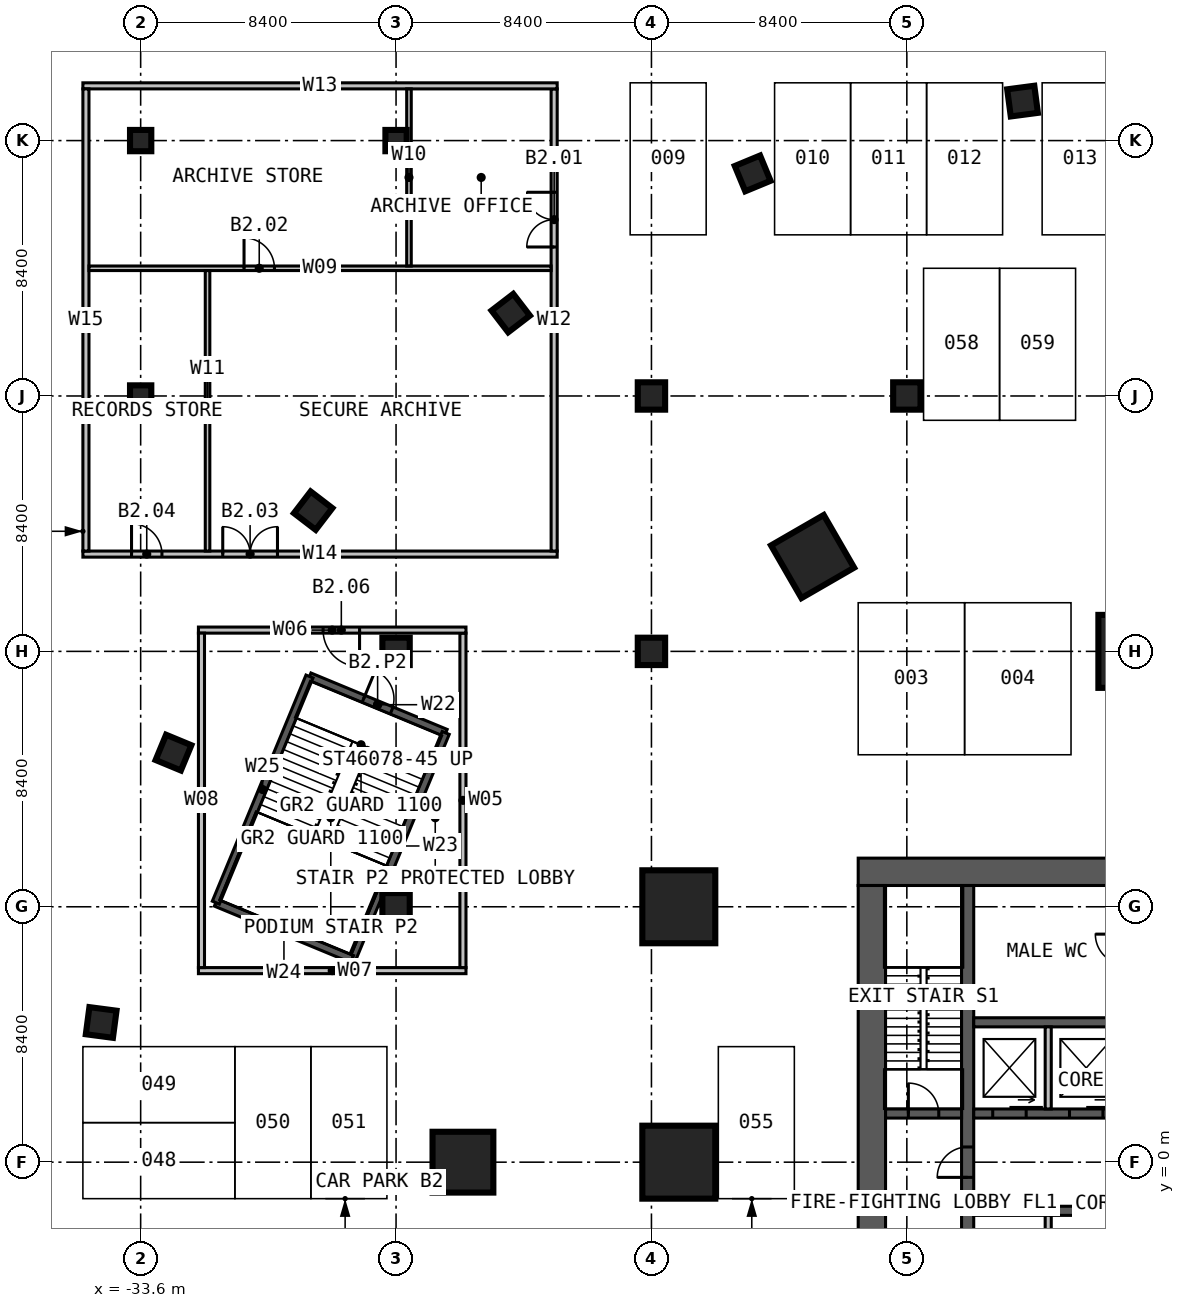
"""IFC4 building model, lengths in metres.
Left out: names, types, materials, properties, quantities, classifications, styles, units other than length and angle.
Written with IfcOpenShell. Run it as: python <this file> out.ifc"""

import sys

from ifc_helpers import new_model, si_unit, direction, frame, frame_2d, origin, origin_2d, place, context, subcontext, project, spatial, rectangle, hollow_rectangle, extrude, element, fill, save


model = new_model("IFC4")
c1 = context("Model", 3, precision=1e-05, world=origin(), true_north=direction((0.0, 1.0)))
c2 = subcontext(c1, "Body", "Model", "MODEL_VIEW")
j1 = project(units=[si_unit("LENGTHUNIT", "METRE"), si_unit("PLANEANGLEUNIT", "RADIAN")], contexts=[c1])
p1 = place(None, origin())
s1 = spatial("IfcSite", under=j1, at=p1, CompositionType="ELEMENT")
p2 = place(p1, origin())
s2 = spatial("IfcBuilding", under=s1, at=p2, CompositionType="ELEMENT")
p3 = place(p2, frame((0.0, 0.0, -9.0)))
s3 = spatial("IfcBuildingStorey", under=s2, at=p3, CompositionType="ELEMENT", Elevation=-9.0)
for number, where, z_axis, x_axis in (
    (1, (-25.2, 8.4, 0.0), (0.0, 0.0, 1.0), (1.0, 0.0, 0.0)),
    (2, (-25.2, 16.8, 0.0), (0.0, 0.0, 1.0), (1.0, 0.0, 0.0)),
):
    element("IfcColumn", number, at=place(p3, frame(where, z_axis=z_axis, x_axis=x_axis)), inside=s3, PredefinedType="COLUMN", context=c2, shape_type="SweptSolid", body=[
        extrude(rectangle(XDim=0.9, YDim=0.9, at=origin_2d()), origin(), (0.0, 0.0, 1.0), 4.5),
    ])
for number, where, z_axis, x_axis in (
    (3, (-15.9, 0.0, 0.0), (0.0, 0.0, 1.0), (1.0, 0.0, 0.0)),
    (4, (-15.9, 8.4, 0.0), (0.0, 0.0, 1.0), (1.0, 0.0, 0.0)),
):
    element("IfcColumn", number, at=place(p3, frame(where, z_axis=z_axis, x_axis=x_axis)), inside=s3, PredefinedType="COLUMN", context=c2, shape_type="SweptSolid", body=[
        extrude(rectangle(XDim=2.4, YDim=2.4, at=origin_2d()), origin(), (0.0, 0.0, 1.0), 4.5),
    ])
for number, where, z_axis, x_axis in (
    (5, (-16.8, 16.8, 0.0), (0.0, 0.0, 1.0), (1.0, 0.0, 0.0)),
    (6, (-16.8, 25.2, 0.0), (0.0, 0.0, 1.0), (1.0, 0.0, 0.0)),
    (7, (-8.4, 25.2, 0.0), (0.0, 0.0, 1.0), (1.0, 0.0, 0.0)),
):
    element("IfcColumn", number, at=place(p3, frame(where, z_axis=z_axis, x_axis=x_axis)), inside=s3, PredefinedType="COLUMN", context=c2, shape_type="SweptSolid", body=[
        extrude(rectangle(XDim=0.9, YDim=0.9, at=origin_2d()), origin(), (0.0, 0.0, 1.0), 4.5),
    ])
p4 = place(p3, frame((-0.9, 16.8, 0.0), z_axis=(0.0, 0.0, 1.0), x_axis=(1.0, 0.0, 0.0)))
e8 = element("IfcColumn", 8, at=p4, inside=s3, PredefinedType="COLUMN", context=c2, shape_type="SweptSolid", body=[
    extrude(rectangle(XDim=2.4, YDim=2.4, at=origin_2d()), origin(), (0.0, 0.0, 1.0), 4.5),
])
for number, where, z_axis, x_axis in (
    (9, (-33.6, 25.2, 0.0), (0.0, 0.0, 1.0), (1.0, 0.0, 0.0)),
    (10, (-33.6, 33.6, 0.0), (0.0, 0.0, 1.0), (1.0, 0.0, 0.0)),
    (11, (-25.2, 33.6, 0.0), (0.0, 0.0, 1.0), (1.0, 0.0, 0.0)),
):
    element("IfcColumn", number, at=place(p3, frame(where, z_axis=z_axis, x_axis=x_axis)), inside=s3, PredefinedType="COLUMN", context=c2, shape_type="SweptSolid", body=[
        extrude(rectangle(XDim=0.7, YDim=0.7, at=origin_2d()), origin(), (0.0, 0.0, 1.0), 4.5),
    ])
for number, where, z_axis, x_axis in (
    (12, (-4.594, 34.899, 0.0), (0.0, 0.0, 1.0), (-0.131, 0.991, 0.0)),
    (13, (-13.47, 32.521, 0.0), (0.0, 0.0, 1.0), (-0.383, 0.924, 0.0)),
    (14, (-21.428, 27.926, 0.0), (0.0, 0.0, 1.0), (-0.609, 0.793, 0.0)),
    (15, (-27.926, 21.428, 0.0), (0.0, 0.0, 1.0), (-0.793, 0.609, 0.0)),
    (16, (-32.521, 13.47, 0.0), (0.0, 0.0, 1.0), (-0.924, 0.383, 0.0)),
    (17, (-34.899, 4.594, 0.0), (0.0, 0.0, 1.0), (-0.991, 0.131, 0.0)),
):
    element("IfcColumn", number, at=place(p3, frame(where, z_axis=z_axis, x_axis=x_axis)), inside=s3, PredefinedType="COLUMN", context=c2, shape_type="SweptSolid", body=[
        extrude(rectangle(XDim=0.9, YDim=0.9, at=origin_2d()), origin(), (0.0, 0.0, 1.0), 4.5),
    ])
for number, where, z_axis, x_axis in (
    (18, (-11.5, 19.919, 0.0), (0.0, 0.0, 1.0), (-0.5, 0.866, 0.0)),
    (19, (-23.0, 0.0, 0.0), (0.0, 0.0, 1.0), (-1.0, 0.0, 0.0)),
):
    element("IfcColumn", number, at=place(p3, frame(where, z_axis=z_axis, x_axis=x_axis)), inside=s3, PredefinedType="COLUMN", context=c2, shape_type="SweptSolid", body=[
        extrude(hollow_rectangle(XDim=2.0, YDim=2.0, WallThickness=0.24, at=origin_2d()), origin(), (0.0, 0.0, 1.0), 4.5),
    ])
p5 = place(p3, frame((-10.0, 9.55, 0.0), z_axis=(0.0, 0.0, 1.0), x_axis=(1.0, 0.0, 0.0)))
e20 = element("IfcWall", 20, at=p5, inside=s3, PredefinedType="SOLIDWALL", context=c2, shape_type="SweptSolid", body=[
    extrude(rectangle(XDim=20.0, YDim=0.9, at=frame_2d((10.0, 0.0))), origin(), (0.0, 0.0, 1.0), 4.5),
])
p6 = place(p5, frame((9.4, 0.0, 0.0)))
e21 = element("IfcOpeningElement", 21, at=p6, cuts=e20, PredefinedType="OPENING", context=c2, shape_type="SweptSolid", body=[
    extrude(rectangle(XDim=1.2, YDim=2.2, at=frame_2d((0.6, 1.1))), frame((0.0, 0.46, 0.0), z_axis=(0.0, -1.0, 0.0), x_axis=(1.0, 0.0, 0.0)), (0.0, 0.0, 1.0), 0.92),
])
p7 = place(p3, frame((-9.55, 9.1, 0.0), z_axis=(0.0, 0.0, 1.0), x_axis=(0.0, -1.0, 0.0)))
e22 = element("IfcWall", 22, at=p7, inside=s3, PredefinedType="SOLIDWALL", context=c2, shape_type="SweptSolid", body=[
    extrude(rectangle(XDim=18.2, YDim=0.9, at=frame_2d((9.1, 0.0))), origin(), (0.0, 0.0, 1.0), 4.5),
])
p8 = place(p3, frame((-6.4, -9.1, 0.0), z_axis=(0.0, 0.0, 1.0), x_axis=(0.0, 1.0, 0.0)))
e23 = element("IfcWall", 23, at=p8, inside=s3, PredefinedType="SOLIDWALL", context=c2, shape_type="SweptSolid", body=[
    extrude(rectangle(XDim=18.2, YDim=0.4, at=frame_2d((9.1, 0.0))), origin(), (0.0, 0.0, 1.0), 4.5),
])
p9 = place(p8, frame((8.6, 0.0, 0.0)))
e24 = element("IfcOpeningElement", 24, at=p9, cuts=e23, PredefinedType="OPENING", context=c2, shape_type="SweptSolid", body=[
    extrude(rectangle(XDim=1.0, YDim=2.2, at=frame_2d((0.5, 1.1))), frame((0.0, 0.21, 0.0), z_axis=(0.0, -1.0, 0.0), x_axis=(1.0, 0.0, 0.0)), (0.0, 0.0, 1.0), 0.42),
])
p10 = place(p3, frame((-6.2, 1.6, 0.0), z_axis=(0.0, 0.0, 1.0), x_axis=(1.0, 0.0, 0.0)))
e25 = element("IfcWall", 25, at=p10, inside=s3, PredefinedType="SOLIDWALL", context=c2, shape_type="SweptSolid", body=[
    extrude(rectangle(XDim=4.85, YDim=0.3, at=frame_2d((2.425, 0.0))), origin(), (0.0, 0.0, 1.0), 4.5),
])
p11 = place(p10, frame((0.625, 0.0, 0.0)))
e26 = element("IfcOpeningElement", 26, at=p11, cuts=e25, PredefinedType="OPENING", context=c2, shape_type="SweptSolid", body=[
    extrude(rectangle(XDim=1.1, YDim=2.2, at=frame_2d((0.55, 1.1))), frame((0.0, 0.16, 0.0), z_axis=(0.0, -1.0, 0.0), x_axis=(1.0, 0.0, 0.0)), (0.0, 0.0, 1.0), 0.32),
])
p12 = place(p10, frame((3.15, 0.0, 0.0)))
e27 = element("IfcOpeningElement", 27, at=p12, cuts=e25, PredefinedType="OPENING", context=c2, shape_type="SweptSolid", body=[
    extrude(rectangle(XDim=1.1, YDim=2.2, at=frame_2d((0.55, 1.1))), frame((0.0, 0.16, 0.0), z_axis=(0.0, -1.0, 0.0), x_axis=(1.0, 0.0, 0.0)), (0.0, 0.0, 1.0), 0.32),
])
p13 = place(p3, frame((-6.2, 4.6, 0.0), z_axis=(0.0, 0.0, 1.0), x_axis=(1.0, 0.0, 0.0)))
e28 = element("IfcWall", 28, at=p13, inside=s3, PredefinedType="SOLIDWALL", context=c2, shape_type="SweptSolid", body=[
    extrude(rectangle(XDim=4.85, YDim=0.3, at=frame_2d((2.425, 0.0))), origin(), (0.0, 0.0, 1.0), 4.5),
])
p14 = place(p3, frame((-6.2, -1.6, 0.0), z_axis=(0.0, 0.0, 1.0), x_axis=(1.0, 0.0, 0.0)))
e29 = element("IfcWall", 29, at=p14, inside=s3, PredefinedType="SOLIDWALL", context=c2, shape_type="SweptSolid", body=[
    extrude(rectangle(XDim=7.4, YDim=0.3, at=frame_2d((3.7, 0.0))), origin(), (0.0, 0.0, 1.0), 4.5),
])
p15 = place(p3, frame((-9.1, 1.6, 0.0), z_axis=(0.0, 0.0, 1.0), x_axis=(1.0, 0.0, 0.0)))
e30 = element("IfcWall", 30, at=p15, inside=s3, PredefinedType="SOLIDWALL", context=c2, shape_type="SweptSolid", body=[
    extrude(rectangle(XDim=2.5, YDim=0.3, at=frame_2d((1.25, 0.0))), origin(), (0.0, 0.0, 1.0), 4.5),
])
p16 = place(p15, frame((0.75, 0.0, 0.0)))
e31 = element("IfcOpeningElement", 31, at=p16, cuts=e30, PredefinedType="OPENING", context=c2, shape_type="SweptSolid", body=[
    extrude(rectangle(XDim=1.0, YDim=2.2, at=frame_2d((0.5, 1.1))), frame((0.0, 0.16, 0.0), z_axis=(0.0, -1.0, 0.0), x_axis=(1.0, 0.0, 0.0)), (0.0, 0.0, 1.0), 0.32),
])
for number, where, z_axis, x_axis in (
    (32, (-3.75, 1.75, 0.0), (0.0, 0.0, 1.0), (0.0, 1.0, 0.0)),
    (33, (-3.75, -1.75, 0.0), (0.0, 0.0, 1.0), (0.0, -1.0, 0.0)),
):
    element("IfcWall", number, at=place(p3, frame(where, z_axis=z_axis, x_axis=x_axis)), inside=s3, PredefinedType="SOLIDWALL", context=c2, shape_type="SweptSolid", body=[
        extrude(rectangle(XDim=2.7, YDim=0.2, at=frame_2d((1.35, 0.0))), origin(), (0.0, 0.0, 1.0), 4.25),
    ])
p17 = place(p3, frame((-28.047, 15.974, 0.0), z_axis=(0.0, 0.0, 1.0), x_axis=(0.923862828997, -0.382723755727, 0.0)))
e34 = element("IfcWall", 34, at=p17, inside=s3, PredefinedType="SOLIDWALL", context=c2, shape_type="SweptSolid", body=[
    extrude(rectangle(XDim=4.85, YDim=0.25, at=frame_2d((2.425, 0.0))), origin(), (0.0, 0.0, 1.0), 4.5),
])
p18 = place(p17, frame((1.925, 0.0, 0.0)))
e35 = element("IfcOpeningElement", 35, at=p18, cuts=e34, PredefinedType="OPENING", context=c2, shape_type="SweptSolid", body=[
    extrude(rectangle(XDim=1.0, YDim=2.2, at=frame_2d((0.5, 1.1))), frame((0.0, 0.135, 0.0), z_axis=(0.0, -1.0, 0.0), x_axis=(1.0, 0.0, 0.0)), (0.0, 0.0, 1.0), 0.27),
])
p19 = place(p3, frame((-23.566, 14.118, 0.0), z_axis=(0.0, 0.0, 1.0), x_axis=(-0.382689294869, -0.923877104161, 0.0)))
e36 = element("IfcWall", 36, at=p19, inside=s3, PredefinedType="SOLIDWALL", context=c2, shape_type="SweptSolid", body=[
    extrude(rectangle(XDim=8.05, YDim=0.25, at=frame_2d((4.025, 0.0))), origin(), (0.0, 0.0, 1.0), 4.5),
])
p20 = place(p3, frame((-26.647, 6.681, 0.0), z_axis=(0.0, 0.0, 1.0), x_axis=(-0.923880627248, 0.382680789426, 0.0)))
e37 = element("IfcWall", 37, at=p20, inside=s3, PredefinedType="SOLIDWALL", context=c2, shape_type="SweptSolid", body=[
    extrude(rectangle(XDim=4.85, YDim=0.25, at=frame_2d((2.425, 0.0))), origin(), (0.0, 0.0, 1.0), 4.5),
])
p21 = place(p3, frame((-31.127, 8.537, 0.0), z_axis=(0.0, 0.0, 1.0), x_axis=(0.382678572144, 0.923881545666, 0.0)))
e38 = element("IfcWall", 38, at=p21, inside=s3, PredefinedType="SOLIDWALL", context=c2, shape_type="SweptSolid", body=[
    extrude(rectangle(XDim=8.05, YDim=0.25, at=frame_2d((4.025, 0.0))), origin(), (0.0, 0.0, 1.0), 4.5),
])
p22 = place(p3, frame((-31.7, 6.3, 0.0), z_axis=(0.0, 0.0, 1.0), x_axis=(1.0, 0.0, 0.0)))
e39 = element("IfcWall", 39, at=p22, inside=s3, PredefinedType="PARTITIONING", context=c2, shape_type="SweptSolid", body=[
    extrude(rectangle(XDim=8.8, YDim=0.2, at=frame_2d((4.4, 0.0))), origin(), (0.0, 0.0, 1.0), 4.2),
])
p23 = place(p3, frame((-23.0, 6.4, 0.0), z_axis=(0.0, 0.0, 1.0), x_axis=(0.0, 1.0, 0.0)))
e40 = element("IfcWall", 40, at=p23, inside=s3, PredefinedType="PARTITIONING", context=c2, shape_type="SweptSolid", body=[
    extrude(rectangle(XDim=11.0, YDim=0.2, at=frame_2d((5.5, 0.0))), origin(), (0.0, 0.0, 1.0), 4.2),
])
p24 = place(p3, frame((-22.9, 17.5, 0.0), z_axis=(0.0, 0.0, 1.0), x_axis=(-1.0, 0.0, 0.0)))
e41 = element("IfcWall", 41, at=p24, inside=s3, PredefinedType="PARTITIONING", context=c2, shape_type="SweptSolid", body=[
    extrude(rectangle(XDim=8.8, YDim=0.2, at=frame_2d((4.4, 0.0))), origin(), (0.0, 0.0, 1.0), 4.2),
])
p25 = place(p24, frame((3.5, 0.0, 0.0)))
e42 = element("IfcOpeningElement", 42, at=p25, cuts=e41, PredefinedType="OPENING", context=c2, shape_type="SweptSolid", body=[
    extrude(rectangle(XDim=1.2, YDim=2.2, at=frame_2d((0.6, 1.1))), frame((0.0, 0.11, 0.0), z_axis=(0.0, -1.0, 0.0), x_axis=(1.0, 0.0, 0.0)), (0.0, 0.0, 1.0), 0.22),
])
p26 = place(p3, frame((-31.6, 17.4, 0.0), z_axis=(0.0, 0.0, 1.0), x_axis=(0.0, -1.0, 0.0)))
e43 = element("IfcWall", 43, at=p26, inside=s3, PredefinedType="PARTITIONING", context=c2, shape_type="SweptSolid", body=[
    extrude(rectangle(XDim=11.0, YDim=0.2, at=frame_2d((5.5, 0.0))), origin(), (0.0, 0.0, 1.0), 4.2),
])
p27 = place(p3, frame((-35.5, 20.0, 0.0), z_axis=(0.0, 0.0, 1.0), x_axis=(1.0, 0.0, 0.0)))
e44 = element("IfcWall", 44, at=p27, inside=s3, PredefinedType="PARTITIONING", context=c2, shape_type="SweptSolid", body=[
    extrude(rectangle(XDim=15.6, YDim=0.2, at=frame_2d((7.8, 0.0))), origin(), (0.0, 0.0, 1.0), 4.2),
])
p28 = place(p27, frame((4.6, 0.0, 0.0)))
e45 = element("IfcOpeningElement", 45, at=p28, cuts=e44, PredefinedType="OPENING", context=c2, shape_type="SweptSolid", body=[
    extrude(rectangle(XDim=1.8, YDim=2.4, at=frame_2d((0.9, 1.2))), frame((0.0, 0.11, 0.0), z_axis=(0.0, -1.0, 0.0), x_axis=(1.0, 0.0, 0.0)), (0.0, 0.0, 1.0), 0.22),
])
p29 = place(p27, frame((1.6, 0.0, 0.0)))
e46 = element("IfcOpeningElement", 46, at=p29, cuts=e44, PredefinedType="OPENING", context=c2, shape_type="SweptSolid", body=[
    extrude(rectangle(XDim=1.0, YDim=2.2, at=frame_2d((0.5, 1.1))), frame((0.0, 0.11, 0.0), z_axis=(0.0, -1.0, 0.0), x_axis=(1.0, 0.0, 0.0)), (0.0, 0.0, 1.0), 0.22),
])
p30 = place(p3, frame((-20.0, 20.1, 0.0), z_axis=(0.0, 0.0, 1.0), x_axis=(0.0, 1.0, 0.0)))
e47 = element("IfcWall", 47, at=p30, inside=s3, PredefinedType="PARTITIONING", context=c2, shape_type="SweptSolid", body=[
    extrude(rectangle(XDim=15.2, YDim=0.2, at=frame_2d((7.6, 0.0))), origin(), (0.0, 0.0, 1.0), 4.2),
])
p31 = place(p30, frame((10.0, 0.0, 0.0)))
e48 = element("IfcOpeningElement", 48, at=p31, cuts=e47, PredefinedType="OPENING", context=c2, shape_type="SweptSolid", body=[
    extrude(rectangle(XDim=1.8, YDim=2.4, at=frame_2d((0.9, 1.2))), frame((0.0, 0.11, 0.0), z_axis=(0.0, -1.0, 0.0), x_axis=(1.0, 0.0, 0.0)), (0.0, 0.0, 1.0), 0.22),
])
p32 = place(p3, frame((-19.9, 35.4, 0.0), z_axis=(0.0, 0.0, 1.0), x_axis=(-1.0, 0.0, 0.0)))
e49 = element("IfcWall", 49, at=p32, inside=s3, PredefinedType="PARTITIONING", context=c2, shape_type="SweptSolid", body=[
    extrude(rectangle(XDim=15.6, YDim=0.2, at=frame_2d((7.8, 0.0))), origin(), (0.0, 0.0, 1.0), 4.2),
])
p33 = place(p3, frame((-35.4, 35.3, 0.0), z_axis=(0.0, 0.0, 1.0), x_axis=(0.0, -1.0, 0.0)))
e50 = element("IfcWall", 50, at=p33, inside=s3, PredefinedType="PARTITIONING", context=c2, shape_type="SweptSolid", body=[
    extrude(rectangle(XDim=15.2, YDim=0.2, at=frame_2d((7.6, 0.0))), origin(), (0.0, 0.0, 1.0), 4.2),
])
p34 = place(p3, frame((-35.3, 29.4, 0.0), z_axis=(0.0, 0.0, 1.0), x_axis=(1.0, 0.0, 0.0)))
e51 = element("IfcWall", 51, at=p34, inside=s3, PredefinedType="PARTITIONING", context=c2, shape_type="SweptSolid", body=[
    extrude(rectangle(XDim=15.2, YDim=0.15, at=frame_2d((7.6, 0.0))), origin(), (0.0, 0.0, 1.0), 4.2),
])
p35 = place(p34, frame((5.1, 0.0, 0.0)))
e52 = element("IfcOpeningElement", 52, at=p35, cuts=e51, PredefinedType="OPENING", context=c2, shape_type="SweptSolid", body=[
    extrude(rectangle(XDim=1.0, YDim=2.2, at=frame_2d((0.5, 1.1))), frame((0.0, 0.085, 0.0), z_axis=(0.0, -1.0, 0.0), x_axis=(1.0, 0.0, 0.0)), (0.0, 0.0, 1.0), 0.17),
])
p36 = place(p3, frame((-31.4, 20.1, 0.0), z_axis=(0.0, 0.0, 1.0), x_axis=(0.0, 1.0, 0.0)))
e53 = element("IfcWall", 53, at=p36, inside=s3, PredefinedType="PARTITIONING", context=c2, shape_type="SweptSolid", body=[
    extrude(rectangle(XDim=9.225, YDim=0.15, at=frame_2d((4.612, 0.0))), origin(), (0.0, 0.0, 1.0), 4.2),
])
p37 = place(p3, frame((-24.775, 29.475, 0.0), z_axis=(0.0, 0.0, 1.0), x_axis=(0.0, 1.0, 0.0)))
e54 = element("IfcWall", 54, at=p37, inside=s3, PredefinedType="PARTITIONING", context=c2, shape_type="SweptSolid", body=[
    extrude(rectangle(XDim=5.825, YDim=0.15, at=frame_2d((2.913, 0.0))), origin(), (0.0, 0.0, 1.0), 4.2),
])
p38 = place(p9, origin())
e55 = element("IfcDoor", 55, at=p38, inside=s3, OperationType="SINGLE_SWING_LEFT", PredefinedType="DOOR", context=c2, shape_type="SweptSolid", body=[
    extrude(rectangle(XDim=1.0, YDim=2.2, at=frame_2d((0.5, 1.1))), frame((0.0, 0.025, 0.0), z_axis=(0.0, -1.0, 0.0), x_axis=(1.0, 0.0, 0.0)), (0.0, 0.0, 1.0), 0.05),
])
fill(e24, e55)
p39 = place(p16, origin())
e56 = element("IfcDoor", 56, at=p39, inside=s3, OperationType="SINGLE_SWING_LEFT", PredefinedType="DOOR", context=c2, shape_type="SweptSolid", body=[
    extrude(rectangle(XDim=1.0, YDim=2.2, at=frame_2d((0.5, 1.1))), frame((0.0, 0.025, 0.0), z_axis=(0.0, -1.0, 0.0), x_axis=(1.0, 0.0, 0.0)), (0.0, 0.0, 1.0), 0.05),
])
fill(e31, e56)
p40 = place(p18, origin())
e57 = element("IfcDoor", 57, at=p40, inside=s3, OperationType="SINGLE_SWING_LEFT", PredefinedType="DOOR", context=c2, shape_type="SweptSolid", body=[
    extrude(rectangle(XDim=1.0, YDim=2.2, at=frame_2d((0.5, 1.1))), frame((0.0, 0.025, 0.0), z_axis=(0.0, -1.0, 0.0), x_axis=(1.0, 0.0, 0.0)), (0.0, 0.0, 1.0), 0.05),
])
fill(e35, e57)
p41 = place(p11, origin())
e58 = element("IfcDoor", 58, at=p41, inside=s3, OperationType="SLIDING_TO_LEFT", PredefinedType="DOOR", context=c2, shape_type="SweptSolid", body=[
    extrude(rectangle(XDim=1.1, YDim=2.2, at=frame_2d((0.55, 1.1))), frame((0.0, 0.025, 0.0), z_axis=(0.0, -1.0, 0.0), x_axis=(1.0, 0.0, 0.0)), (0.0, 0.0, 1.0), 0.05),
])
fill(e26, e58)
p42 = place(p12, origin())
e59 = element("IfcDoor", 59, at=p42, inside=s3, OperationType="SLIDING_TO_LEFT", PredefinedType="DOOR", context=c2, shape_type="SweptSolid", body=[
    extrude(rectangle(XDim=1.1, YDim=2.2, at=frame_2d((0.55, 1.1))), frame((0.0, 0.025, 0.0), z_axis=(0.0, -1.0, 0.0), x_axis=(1.0, 0.0, 0.0)), (0.0, 0.0, 1.0), 0.05),
])
fill(e27, e59)
p43 = place(p25, origin())
e60 = element("IfcDoor", 60, at=p43, inside=s3, OperationType="SINGLE_SWING_LEFT", PredefinedType="DOOR", context=c2, shape_type="SweptSolid", body=[
    extrude(rectangle(XDim=1.2, YDim=2.2, at=frame_2d((0.6, 1.1))), frame((0.0, 0.025, 0.0), z_axis=(0.0, -1.0, 0.0), x_axis=(1.0, 0.0, 0.0)), (0.0, 0.0, 1.0), 0.05),
])
fill(e42, e60)
p44 = place(p28, origin())
e61 = element("IfcDoor", 61, at=p44, inside=s3, OperationType="DOUBLE_DOOR_SINGLE_SWING", PredefinedType="DOOR", context=c2, shape_type="SweptSolid", body=[
    extrude(rectangle(XDim=1.8, YDim=2.4, at=frame_2d((0.9, 1.2))), frame((0.0, 0.025, 0.0), z_axis=(0.0, -1.0, 0.0), x_axis=(1.0, 0.0, 0.0)), (0.0, 0.0, 1.0), 0.05),
])
fill(e45, e61)
p45 = place(p31, origin())
e62 = element("IfcDoor", 62, at=p45, inside=s3, OperationType="DOUBLE_DOOR_SINGLE_SWING", PredefinedType="DOOR", context=c2, shape_type="SweptSolid", body=[
    extrude(rectangle(XDim=1.8, YDim=2.4, at=frame_2d((0.9, 1.2))), frame((0.0, 0.025, 0.0), z_axis=(0.0, -1.0, 0.0), x_axis=(1.0, 0.0, 0.0)), (0.0, 0.0, 1.0), 0.05),
])
fill(e48, e62)
p46 = place(p29, origin())
e63 = element("IfcDoor", 63, at=p46, inside=s3, OperationType="SINGLE_SWING_LEFT", PredefinedType="DOOR", context=c2, shape_type="SweptSolid", body=[
    extrude(rectangle(XDim=1.0, YDim=2.2, at=frame_2d((0.5, 1.1))), frame((0.0, 0.025, 0.0), z_axis=(0.0, -1.0, 0.0), x_axis=(1.0, 0.0, 0.0)), (0.0, 0.0, 1.0), 0.05),
])
fill(e46, e63)
p47 = place(p35, origin())
e64 = element("IfcDoor", 64, at=p47, inside=s3, OperationType="SINGLE_SWING_LEFT", PredefinedType="DOOR", context=c2, shape_type="SweptSolid", body=[
    extrude(rectangle(XDim=1.0, YDim=2.2, at=frame_2d((0.5, 1.1))), frame((0.0, 0.025, 0.0), z_axis=(0.0, -1.0, 0.0), x_axis=(1.0, 0.0, 0.0)), (0.0, 0.0, 1.0), 0.05),
])
fill(e52, e64)
save(model, sys.argv[1])
